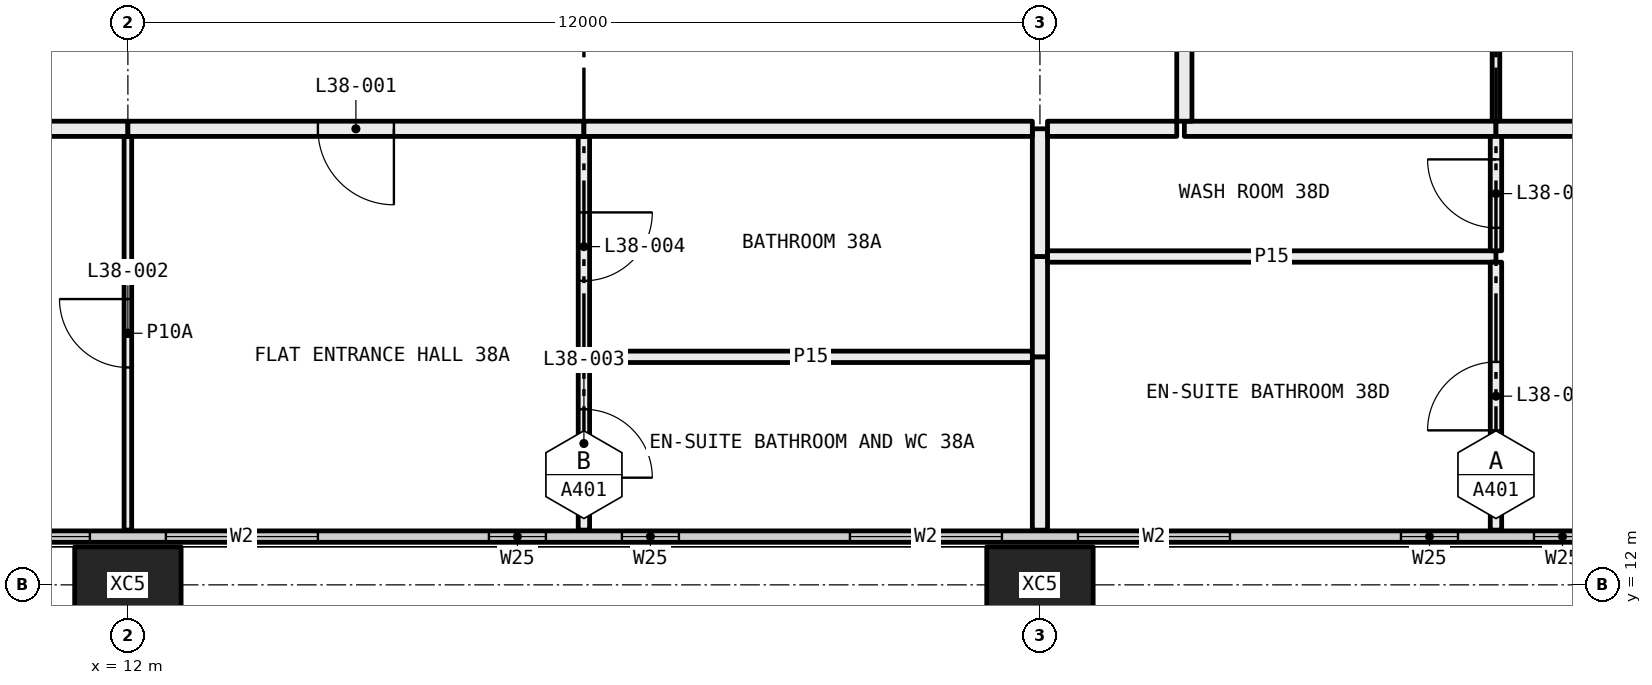
"""IFC4 building model, lengths in metres.
Left out: names, types, materials, properties, quantities, classifications, styles, units other than length and angle.
Written with IfcOpenShell. Run it as: python <this file> out.ifc"""

import sys

from ifc_helpers import new_model, si_unit, direction, frame, frame_2d, origin, origin_2d, place, context, subcontext, project, spatial, rectangle, hollow_rectangle, extrude, element, fill, save


model = new_model("IFC4")
c1 = context("Model", 3, precision=1e-05, world=origin(), true_north=direction((0.0, 1.0)))
c2 = subcontext(c1, "Body", "Model", "MODEL_VIEW")
j1 = project(units=[si_unit("LENGTHUNIT", "METRE"), si_unit("PLANEANGLEUNIT", "RADIAN")], contexts=[c1])
p1 = place(None, origin())
s1 = spatial("IfcSite", under=j1, at=p1, CompositionType="ELEMENT")
p2 = place(p1, origin())
s2 = spatial("IfcBuilding", under=s1, at=p2, CompositionType="ELEMENT")
p3 = place(p2, frame((0.0, 0.0, 144.9)))
s3 = spatial("IfcBuildingStorey", under=s2, at=p3, CompositionType="ELEMENT", Elevation=144.9)
for number, where, z_axis, x_axis in (
    (1, (12.0, 12.0, -0.4), (0.0, 0.0, 1.0), (1.0, 0.0, 0.0)),
    (2, (24.0, 12.0, -0.4), (0.0, 0.0, 1.0), (1.0, 0.0, 0.0)),
):
    element("IfcColumn", number, at=place(p3, frame(where, z_axis=z_axis, x_axis=x_axis)), inside=s3, PredefinedType="COLUMN", context=c2, shape_type="SweptSolid", body=[
        extrude(hollow_rectangle(XDim=1.4, YDim=1.0, WallThickness=0.055, at=origin_2d()), origin(), (0.0, 0.0, 1.0), 3.45),
    ])
p4 = place(p3, frame((6.56, 12.635, 0.0), z_axis=(0.0, 0.0, 1.0), x_axis=(1.0, 0.0, 0.0)))
e3 = element("IfcWall", 3, at=p4, inside=s3, PredefinedType="ELEMENTEDWALL", context=c2, shape_type="SweptSolid", body=[
    extrude(rectangle(XDim=58.88, YDim=0.15, at=frame_2d((29.44, 0.0))), origin(), (0.0, 0.0, 1.0), 3.05),
])
p5 = place(p4, frame((0.44, 0.0, 0.45)))
e4 = element("IfcOpeningElement", 4, at=p5, cuts=e3, PredefinedType="OPENING", context=c2, shape_type="SweptSolid", body=[
    extrude(rectangle(XDim=4.5, YDim=2.55, at=frame_2d((2.25, 1.275))), frame((0.0, 0.085, 0.0), z_axis=(0.0, -1.0, 0.0), x_axis=(1.0, 0.0, 0.0)), (0.0, 0.0, 1.0), 0.17),
])
p6 = place(p4, frame((5.94, 0.0, 0.45)))
e5 = element("IfcOpeningElement", 5, at=p6, cuts=e3, PredefinedType="OPENING", context=c2, shape_type="SweptSolid", body=[
    extrude(rectangle(XDim=2.0, YDim=2.55, at=frame_2d((1.0, 1.275))), frame((0.0, 0.085, 0.0), z_axis=(0.0, -1.0, 0.0), x_axis=(1.0, 0.0, 0.0)), (0.0, 0.0, 1.0), 0.17),
])
p7 = place(p4, frame((10.19, 0.0, 0.45)))
e6 = element("IfcOpeningElement", 6, at=p7, cuts=e3, PredefinedType="OPENING", context=c2, shape_type="SweptSolid", body=[
    extrude(rectangle(XDim=0.75, YDim=2.55, at=frame_2d((0.375, 1.275))), frame((0.0, 0.085, 0.0), z_axis=(0.0, -1.0, 0.0), x_axis=(1.0, 0.0, 0.0)), (0.0, 0.0, 1.0), 0.17),
])
p8 = place(p4, frame((11.94, 0.0, 0.45)))
e7 = element("IfcOpeningElement", 7, at=p8, cuts=e3, PredefinedType="OPENING", context=c2, shape_type="SweptSolid", body=[
    extrude(rectangle(XDim=0.75, YDim=2.55, at=frame_2d((0.375, 1.275))), frame((0.0, 0.085, 0.0), z_axis=(0.0, -1.0, 0.0), x_axis=(1.0, 0.0, 0.0)), (0.0, 0.0, 1.0), 0.17),
])
p9 = place(p4, frame((14.94, 0.0, 0.45)))
e8 = element("IfcOpeningElement", 8, at=p9, cuts=e3, PredefinedType="OPENING", context=c2, shape_type="SweptSolid", body=[
    extrude(rectangle(XDim=2.0, YDim=2.55, at=frame_2d((1.0, 1.275))), frame((0.0, 0.085, 0.0), z_axis=(0.0, -1.0, 0.0), x_axis=(1.0, 0.0, 0.0)), (0.0, 0.0, 1.0), 0.17),
])
p10 = place(p4, frame((17.94, 0.0, 0.45)))
e9 = element("IfcOpeningElement", 9, at=p10, cuts=e3, PredefinedType="OPENING", context=c2, shape_type="SweptSolid", body=[
    extrude(rectangle(XDim=2.0, YDim=2.55, at=frame_2d((1.0, 1.275))), frame((0.0, 0.085, 0.0), z_axis=(0.0, -1.0, 0.0), x_axis=(1.0, 0.0, 0.0)), (0.0, 0.0, 1.0), 0.17),
])
p11 = place(p4, frame((22.19, 0.0, 0.45)))
e10 = element("IfcOpeningElement", 10, at=p11, cuts=e3, PredefinedType="OPENING", context=c2, shape_type="SweptSolid", body=[
    extrude(rectangle(XDim=0.75, YDim=2.55, at=frame_2d((0.375, 1.275))), frame((0.0, 0.085, 0.0), z_axis=(0.0, -1.0, 0.0), x_axis=(1.0, 0.0, 0.0)), (0.0, 0.0, 1.0), 0.17),
])
p12 = place(p4, frame((23.94, 0.0, 0.45)))
e11 = element("IfcOpeningElement", 11, at=p12, cuts=e3, PredefinedType="OPENING", context=c2, shape_type="SweptSolid", body=[
    extrude(rectangle(XDim=0.75, YDim=2.55, at=frame_2d((0.375, 1.275))), frame((0.0, 0.085, 0.0), z_axis=(0.0, -1.0, 0.0), x_axis=(1.0, 0.0, 0.0)), (0.0, 0.0, 1.0), 0.17),
])
p13 = place(p4, frame((26.94, 0.0, 0.45)))
e12 = element("IfcOpeningElement", 12, at=p13, cuts=e3, PredefinedType="OPENING", context=c2, shape_type="SweptSolid", body=[
    extrude(rectangle(XDim=2.0, YDim=2.55, at=frame_2d((1.0, 1.275))), frame((0.0, 0.085, 0.0), z_axis=(0.0, -1.0, 0.0), x_axis=(1.0, 0.0, 0.0)), (0.0, 0.0, 1.0), 0.17),
])
p14 = place(p4, frame((29.94, 0.0, 0.45)))
e13 = element("IfcOpeningElement", 13, at=p14, cuts=e3, PredefinedType="OPENING", context=c2, shape_type="SweptSolid", body=[
    extrude(rectangle(XDim=2.0, YDim=2.55, at=frame_2d((1.0, 1.275))), frame((0.0, 0.085, 0.0), z_axis=(0.0, -1.0, 0.0), x_axis=(1.0, 0.0, 0.0)), (0.0, 0.0, 1.0), 0.17),
])
p15 = place(p4, frame((34.19, 0.0, 0.45)))
e14 = element("IfcOpeningElement", 14, at=p15, cuts=e3, PredefinedType="OPENING", context=c2, shape_type="SweptSolid", body=[
    extrude(rectangle(XDim=0.75, YDim=2.55, at=frame_2d((0.375, 1.275))), frame((0.0, 0.085, 0.0), z_axis=(0.0, -1.0, 0.0), x_axis=(1.0, 0.0, 0.0)), (0.0, 0.0, 1.0), 0.17),
])
p16 = place(p4, frame((35.94, 0.0, 0.45)))
e15 = element("IfcOpeningElement", 15, at=p16, cuts=e3, PredefinedType="OPENING", context=c2, shape_type="SweptSolid", body=[
    extrude(rectangle(XDim=0.75, YDim=2.55, at=frame_2d((0.375, 1.275))), frame((0.0, 0.085, 0.0), z_axis=(0.0, -1.0, 0.0), x_axis=(1.0, 0.0, 0.0)), (0.0, 0.0, 1.0), 0.17),
])
p17 = place(p4, frame((38.94, 0.0, 0.45)))
e16 = element("IfcOpeningElement", 16, at=p17, cuts=e3, PredefinedType="OPENING", context=c2, shape_type="SweptSolid", body=[
    extrude(rectangle(XDim=2.0, YDim=2.55, at=frame_2d((1.0, 1.275))), frame((0.0, 0.085, 0.0), z_axis=(0.0, -1.0, 0.0), x_axis=(1.0, 0.0, 0.0)), (0.0, 0.0, 1.0), 0.17),
])
p18 = place(p4, frame((41.94, 0.0, 0.45)))
e17 = element("IfcOpeningElement", 17, at=p18, cuts=e3, PredefinedType="OPENING", context=c2, shape_type="SweptSolid", body=[
    extrude(rectangle(XDim=2.0, YDim=2.55, at=frame_2d((1.0, 1.275))), frame((0.0, 0.085, 0.0), z_axis=(0.0, -1.0, 0.0), x_axis=(1.0, 0.0, 0.0)), (0.0, 0.0, 1.0), 0.17),
])
p19 = place(p4, frame((46.19, 0.0, 0.45)))
e18 = element("IfcOpeningElement", 18, at=p19, cuts=e3, PredefinedType="OPENING", context=c2, shape_type="SweptSolid", body=[
    extrude(rectangle(XDim=0.75, YDim=2.55, at=frame_2d((0.375, 1.275))), frame((0.0, 0.085, 0.0), z_axis=(0.0, -1.0, 0.0), x_axis=(1.0, 0.0, 0.0)), (0.0, 0.0, 1.0), 0.17),
])
p20 = place(p4, frame((47.94, 0.0, 0.45)))
e19 = element("IfcOpeningElement", 19, at=p20, cuts=e3, PredefinedType="OPENING", context=c2, shape_type="SweptSolid", body=[
    extrude(rectangle(XDim=0.75, YDim=2.55, at=frame_2d((0.375, 1.275))), frame((0.0, 0.085, 0.0), z_axis=(0.0, -1.0, 0.0), x_axis=(1.0, 0.0, 0.0)), (0.0, 0.0, 1.0), 0.17),
])
p21 = place(p4, frame((50.94, 0.0, 0.45)))
e20 = element("IfcOpeningElement", 20, at=p21, cuts=e3, PredefinedType="OPENING", context=c2, shape_type="SweptSolid", body=[
    extrude(rectangle(XDim=2.0, YDim=2.55, at=frame_2d((1.0, 1.275))), frame((0.0, 0.085, 0.0), z_axis=(0.0, -1.0, 0.0), x_axis=(1.0, 0.0, 0.0)), (0.0, 0.0, 1.0), 0.17),
])
p22 = place(p4, frame((53.94, 0.0, 0.45)))
e21 = element("IfcOpeningElement", 21, at=p22, cuts=e3, PredefinedType="OPENING", context=c2, shape_type="SweptSolid", body=[
    extrude(rectangle(XDim=4.5, YDim=2.55, at=frame_2d((2.25, 1.275))), frame((0.0, 0.085, 0.0), z_axis=(0.0, -1.0, 0.0), x_axis=(1.0, 0.0, 0.0)), (0.0, 0.0, 1.0), 0.17),
])
p23 = place(p3, frame((12.0, 12.72, 0.0), z_axis=(0.0, 0.0, 1.0), x_axis=(0.0, 1.0, 0.0)))
e22 = element("IfcWall", 22, at=p23, inside=s3, PredefinedType="PARTITIONING", context=c2, shape_type="SweptSolid", body=[
    extrude(rectangle(XDim=5.18, YDim=0.1, at=frame_2d((2.59, 0.0))), origin(), (0.0, 0.0, 1.0), 3.05),
])
p24 = place(p23, frame((2.14, 0.0, 0.0)))
e23 = element("IfcOpeningElement", 23, at=p24, cuts=e22, PredefinedType="OPENING", context=c2, shape_type="SweptSolid", body=[
    extrude(rectangle(XDim=0.9, YDim=2.1, at=frame_2d((0.45, 1.05))), frame((0.0, 0.06, 0.0), z_axis=(0.0, -1.0, 0.0), x_axis=(1.0, 0.0, 0.0)), (0.0, 0.0, 1.0), 0.12),
])
p25 = place(p3, frame((12.0, 18.0, 0.0), z_axis=(0.0, 0.0, 1.0), x_axis=(-1.0, 0.0, 0.0)))
e24 = element("IfcWall", 24, at=p25, inside=s3, PredefinedType="PARTITIONING", context=c2, shape_type="SweptSolid", body=[
    extrude(rectangle(XDim=1.9, YDim=0.2, at=frame_2d((0.95, 0.0))), origin(), (0.0, 0.0, 1.0), 3.05),
])
p26 = place(p3, frame((18.0, 12.72, 0.0), z_axis=(0.0, 0.0, 1.0), x_axis=(0.0, 1.0, 0.0)))
e25 = element("IfcWall", 25, at=p26, inside=s3, PredefinedType="PARTITIONING", context=c2, shape_type="SweptSolid", body=[
    extrude(rectangle(XDim=2.28, YDim=0.15, at=frame_2d((1.14, 0.0))), origin(), (0.0, 0.0, 1.0), 3.05),
])
p27 = place(p26, frame((0.69, 0.0, 0.0)))
e26 = element("IfcOpeningElement", 26, at=p27, cuts=e25, PredefinedType="OPENING", context=c2, shape_type="SweptSolid", body=[
    extrude(rectangle(XDim=0.9, YDim=2.1, at=frame_2d((0.45, 1.05))), frame((0.0, 0.085, 0.0), z_axis=(0.0, -1.0, 0.0), x_axis=(1.0, 0.0, 0.0)), (0.0, 0.0, 1.0), 0.17),
])
p28 = place(p3, frame((18.0, 15.0, 0.0), z_axis=(0.0, 0.0, 1.0), x_axis=(0.0, 1.0, 0.0)))
e27 = element("IfcWall", 27, at=p28, inside=s3, PredefinedType="PARTITIONING", context=c2, shape_type="SweptSolid", body=[
    extrude(rectangle(XDim=2.9, YDim=0.15, at=frame_2d((1.45, 0.0))), origin(), (0.0, 0.0, 1.0), 3.05),
])
p29 = place(p28, frame((1.0, 0.0, 0.0)))
e28 = element("IfcOpeningElement", 28, at=p29, cuts=e27, PredefinedType="OPENING", context=c2, shape_type="SweptSolid", body=[
    extrude(rectangle(XDim=0.9, YDim=2.1, at=frame_2d((0.45, 1.05))), frame((0.0, 0.085, 0.0), z_axis=(0.0, -1.0, 0.0), x_axis=(1.0, 0.0, 0.0)), (0.0, 0.0, 1.0), 0.17),
])
p30 = place(p3, frame((18.0, 18.0, 0.0), z_axis=(0.0, 0.0, 1.0), x_axis=(-1.0, 0.0, 0.0)))
e29 = element("IfcWall", 29, at=p30, inside=s3, PredefinedType="PARTITIONING", context=c2, shape_type="SweptSolid", body=[
    extrude(rectangle(XDim=6.0, YDim=0.2, at=frame_2d((3.0, 0.0))), origin(), (0.0, 0.0, 1.0), 3.05),
])
p31 = place(p30, frame((2.5, 0.0, 0.0)))
e30 = element("IfcOpeningElement", 30, at=p31, cuts=e29, PredefinedType="OPENING", context=c2, shape_type="SweptSolid", body=[
    extrude(rectangle(XDim=1.0, YDim=2.1, at=frame_2d((0.5, 1.05))), frame((0.0, 0.11, 0.0), z_axis=(0.0, -1.0, 0.0), x_axis=(1.0, 0.0, 0.0)), (0.0, 0.0, 1.0), 0.22),
])
p32 = place(p3, frame((23.9, 15.0, 0.0), z_axis=(0.0, 0.0, 1.0), x_axis=(-1.0, 0.0, 0.0)))
e31 = element("IfcWall", 31, at=p32, inside=s3, PredefinedType="PARTITIONING", context=c2, shape_type="SweptSolid", body=[
    extrude(rectangle(XDim=5.825, YDim=0.15, at=frame_2d((2.913, 0.0))), origin(), (0.0, 0.0, 1.0), 3.05),
])
p33 = place(p3, frame((24.0, 12.72, 0.0), z_axis=(0.0, 0.0, 1.0), x_axis=(0.0, 1.0, 0.0)))
e32 = element("IfcWall", 32, at=p33, inside=s3, PredefinedType="PARTITIONING", context=c2, shape_type="SweptSolid", body=[
    extrude(rectangle(XDim=2.28, YDim=0.2, at=frame_2d((1.14, 0.0))), origin(), (0.0, 0.0, 1.0), 3.05),
])
p34 = place(p3, frame((24.0, 15.0, 0.0), z_axis=(0.0, 0.0, 1.0), x_axis=(0.0, 1.0, 0.0)))
e33 = element("IfcWall", 33, at=p34, inside=s3, PredefinedType="PARTITIONING", context=c2, shape_type="SweptSolid", body=[
    extrude(rectangle(XDim=1.32, YDim=0.2, at=frame_2d((0.66, 0.0))), origin(), (0.0, 0.0, 1.0), 3.05),
])
p35 = place(p3, frame((24.0, 16.32, 0.0), z_axis=(0.0, 0.0, 1.0), x_axis=(0.0, 1.0, 0.0)))
e34 = element("IfcWall", 34, at=p35, inside=s3, PredefinedType="PARTITIONING", context=c2, shape_type="SweptSolid", body=[
    extrude(rectangle(XDim=1.68, YDim=0.2, at=frame_2d((0.84, 0.0))), origin(), (0.0, 0.0, 1.0), 3.05),
])
p36 = place(p3, frame((23.9, 18.0, 0.0), z_axis=(0.0, 0.0, 1.0), x_axis=(-1.0, 0.0, 0.0)))
e35 = element("IfcWall", 35, at=p36, inside=s3, PredefinedType="PARTITIONING", context=c2, shape_type="SweptSolid", body=[
    extrude(rectangle(XDim=5.9, YDim=0.2, at=frame_2d((2.95, 0.0))), origin(), (0.0, 0.0, 1.0), 3.05),
])
p37 = place(p3, frame((30.0, 18.1, 0.0), z_axis=(0.0, 0.0, 1.0), x_axis=(0.0, 1.0, 0.0)))
e36 = element("IfcWall", 36, at=p37, inside=s3, PredefinedType="PARTITIONING", context=c2, shape_type="SweptSolid", body=[
    extrude(rectangle(XDim=6.2, YDim=0.1, at=frame_2d((3.1, 0.0))), origin(), (0.0, 0.0, 1.0), 2.45),
])
p38 = place(p3, frame((25.9, 18.0, 0.0), z_axis=(0.0, 0.0, 1.0), x_axis=(1.0, 0.0, 0.0)))
e37 = element("IfcWall", 37, at=p38, inside=s3, PredefinedType="PARTITIONING", context=c2, shape_type="SweptSolid", body=[
    extrude(rectangle(XDim=4.1, YDim=0.2, at=frame_2d((2.05, 0.0))), origin(), (0.0, 0.0, 1.0), 3.05),
])
p39 = place(p3, frame((25.9, 23.9, 0.0), z_axis=(0.0, 0.0, 1.0), x_axis=(0.0, -1.0, 0.0)))
e38 = element("IfcWall", 38, at=p39, inside=s3, PredefinedType="PARTITIONING", context=c2, shape_type="SweptSolid", body=[
    extrude(rectangle(XDim=5.8, YDim=0.2, at=frame_2d((2.9, 0.0))), origin(), (0.0, 0.0, 1.0), 3.05),
])
p40 = place(p3, frame((30.0, 18.0, 0.0), z_axis=(0.0, 0.0, 1.0), x_axis=(1.0, 0.0, 0.0)))
e39 = element("IfcWall", 39, at=p40, inside=s3, PredefinedType="PARTITIONING", context=c2, shape_type="SweptSolid", body=[
    extrude(rectangle(XDim=6.0, YDim=0.2, at=frame_2d((3.0, 0.0))), origin(), (0.0, 0.0, 1.0), 2.45),
])
p41 = place(p3, frame((30.0, 16.32, 0.0), z_axis=(0.0, 0.0, 1.0), x_axis=(-1.0, 0.0, 0.0)))
e40 = element("IfcWall", 40, at=p41, inside=s3, PredefinedType="PARTITIONING", context=c2, shape_type="SweptSolid", body=[
    extrude(rectangle(XDim=5.9, YDim=0.15, at=frame_2d((2.95, 0.0))), origin(), (0.0, 0.0, 1.0), 3.05),
])
p42 = place(p3, frame((30.0, 12.72, 0.0), z_axis=(0.0, 0.0, 1.0), x_axis=(0.0, 1.0, 0.0)))
e41 = element("IfcWall", 41, at=p42, inside=s3, PredefinedType="PARTITIONING", context=c2, shape_type="SweptSolid", body=[
    extrude(rectangle(XDim=3.525, YDim=0.15, at=frame_2d((1.763, 0.0))), origin(), (0.0, 0.0, 1.0), 3.05),
])
p43 = place(p42, frame((1.312, 0.0, 0.0)))
e42 = element("IfcOpeningElement", 42, at=p43, cuts=e41, PredefinedType="OPENING", context=c2, shape_type="SweptSolid", body=[
    extrude(rectangle(XDim=0.9, YDim=2.1, at=frame_2d((0.45, 1.05))), frame((0.0, 0.085, 0.0), z_axis=(0.0, -1.0, 0.0), x_axis=(1.0, 0.0, 0.0)), (0.0, 0.0, 1.0), 0.17),
])
p44 = place(p3, frame((30.0, 16.395, 0.0), z_axis=(0.0, 0.0, 1.0), x_axis=(0.0, 1.0, 0.0)))
e43 = element("IfcWall", 43, at=p44, inside=s3, PredefinedType="PARTITIONING", context=c2, shape_type="SweptSolid", body=[
    extrude(rectangle(XDim=1.505, YDim=0.15, at=frame_2d((0.752, 0.0))), origin(), (0.0, 0.0, 1.0), 3.05),
])
p45 = place(p44, frame((0.302, 0.0, 0.0)))
e44 = element("IfcOpeningElement", 44, at=p45, cuts=e43, PredefinedType="OPENING", context=c2, shape_type="SweptSolid", body=[
    extrude(rectangle(XDim=0.9, YDim=2.1, at=frame_2d((0.45, 1.05))), frame((0.0, 0.085, 0.0), z_axis=(0.0, -1.0, 0.0), x_axis=(1.0, 0.0, 0.0)), (0.0, 0.0, 1.0), 0.17),
])
p46 = place(p3, frame((25.8, 18.0, 0.0), z_axis=(0.0, 0.0, 1.0), x_axis=(-1.0, 0.0, 0.0)))
e45 = element("IfcWall", 45, at=p46, inside=s3, PredefinedType="PARTITIONING", context=c2, shape_type="SweptSolid", body=[
    extrude(rectangle(XDim=1.7, YDim=0.2, at=frame_2d((0.85, 0.0))), origin(), (0.0, 0.0, 1.0), 3.05),
])
p47 = place(p5, origin())
e46 = element("IfcWindow", 46, at=p47, inside=s3, PartitioningType="SINGLE_PANEL", PredefinedType="WINDOW", context=c2, shape_type="SweptSolid", body=[
    extrude(rectangle(XDim=4.5, YDim=2.55, at=frame_2d((2.25, 1.275))), frame((0.0, 0.03, 0.0), z_axis=(0.0, -1.0, 0.0), x_axis=(1.0, 0.0, 0.0)), (0.0, 0.0, 1.0), 0.06),
])
fill(e4, e46)
p48 = place(p6, origin())
e47 = element("IfcWindow", 47, at=p48, inside=s3, PartitioningType="SINGLE_PANEL", PredefinedType="WINDOW", context=c2, shape_type="SweptSolid", body=[
    extrude(rectangle(XDim=2.0, YDim=2.55, at=frame_2d((1.0, 1.275))), frame((0.0, 0.03, 0.0), z_axis=(0.0, -1.0, 0.0), x_axis=(1.0, 0.0, 0.0)), (0.0, 0.0, 1.0), 0.06),
])
fill(e5, e47)
p49 = place(p7, origin())
e48 = element("IfcWindow", 48, at=p49, inside=s3, PartitioningType="SINGLE_PANEL", PredefinedType="WINDOW", context=c2, shape_type="SweptSolid", body=[
    extrude(rectangle(XDim=0.75, YDim=2.55, at=frame_2d((0.375, 1.275))), frame((0.0, 0.03, 0.0), z_axis=(0.0, -1.0, 0.0), x_axis=(1.0, 0.0, 0.0)), (0.0, 0.0, 1.0), 0.06),
])
fill(e6, e48)
p50 = place(p8, origin())
e49 = element("IfcWindow", 49, at=p50, inside=s3, PartitioningType="SINGLE_PANEL", PredefinedType="WINDOW", context=c2, shape_type="SweptSolid", body=[
    extrude(rectangle(XDim=0.75, YDim=2.55, at=frame_2d((0.375, 1.275))), frame((0.0, 0.03, 0.0), z_axis=(0.0, -1.0, 0.0), x_axis=(1.0, 0.0, 0.0)), (0.0, 0.0, 1.0), 0.06),
])
fill(e7, e49)
p51 = place(p9, origin())
e50 = element("IfcWindow", 50, at=p51, inside=s3, PartitioningType="SINGLE_PANEL", PredefinedType="WINDOW", context=c2, shape_type="SweptSolid", body=[
    extrude(rectangle(XDim=2.0, YDim=2.55, at=frame_2d((1.0, 1.275))), frame((0.0, 0.03, 0.0), z_axis=(0.0, -1.0, 0.0), x_axis=(1.0, 0.0, 0.0)), (0.0, 0.0, 1.0), 0.06),
])
fill(e8, e50)
p52 = place(p10, origin())
e51 = element("IfcWindow", 51, at=p52, inside=s3, PartitioningType="SINGLE_PANEL", PredefinedType="WINDOW", context=c2, shape_type="SweptSolid", body=[
    extrude(rectangle(XDim=2.0, YDim=2.55, at=frame_2d((1.0, 1.275))), frame((0.0, 0.03, 0.0), z_axis=(0.0, -1.0, 0.0), x_axis=(1.0, 0.0, 0.0)), (0.0, 0.0, 1.0), 0.06),
])
fill(e9, e51)
p53 = place(p11, origin())
e52 = element("IfcWindow", 52, at=p53, inside=s3, PartitioningType="SINGLE_PANEL", PredefinedType="WINDOW", context=c2, shape_type="SweptSolid", body=[
    extrude(rectangle(XDim=0.75, YDim=2.55, at=frame_2d((0.375, 1.275))), frame((0.0, 0.03, 0.0), z_axis=(0.0, -1.0, 0.0), x_axis=(1.0, 0.0, 0.0)), (0.0, 0.0, 1.0), 0.06),
])
fill(e10, e52)
p54 = place(p12, origin())
e53 = element("IfcWindow", 53, at=p54, inside=s3, PartitioningType="SINGLE_PANEL", PredefinedType="WINDOW", context=c2, shape_type="SweptSolid", body=[
    extrude(rectangle(XDim=0.75, YDim=2.55, at=frame_2d((0.375, 1.275))), frame((0.0, 0.03, 0.0), z_axis=(0.0, -1.0, 0.0), x_axis=(1.0, 0.0, 0.0)), (0.0, 0.0, 1.0), 0.06),
])
fill(e11, e53)
p55 = place(p31, origin())
e54 = element("IfcDoor", 54, at=p55, inside=s3, OperationType="SINGLE_SWING_RIGHT", PredefinedType="DOOR", context=c2, shape_type="SweptSolid", body=[
    extrude(rectangle(XDim=1.0, YDim=2.1, at=frame_2d((0.5, 1.05))), frame((0.0, 0.025, 0.0), z_axis=(0.0, -1.0, 0.0), x_axis=(1.0, 0.0, 0.0)), (0.0, 0.0, 1.0), 0.05),
])
fill(e30, e54)
p56 = place(p24, origin())
e55 = element("IfcDoor", 55, at=p56, inside=s3, OperationType="SINGLE_SWING_LEFT", PredefinedType="DOOR", context=c2, shape_type="SweptSolid", body=[
    extrude(rectangle(XDim=0.9, YDim=2.1, at=frame_2d((0.45, 1.05))), frame((0.0, 0.025, 0.0), z_axis=(0.0, -1.0, 0.0), x_axis=(1.0, 0.0, 0.0)), (0.0, 0.0, 1.0), 0.05),
])
fill(e23, e55)
p57 = place(p27, frame((0.9, 0.0, 0.0), x_axis=(-1.0, 0.0, 0.0)))
e56 = element("IfcDoor", 56, at=p57, inside=s3, OperationType="SINGLE_SWING_LEFT", PredefinedType="DOOR", context=c2, shape_type="SweptSolid", body=[
    extrude(rectangle(XDim=0.9, YDim=2.1, at=frame_2d((0.45, 1.05))), frame((0.0, 0.025, 0.0), z_axis=(0.0, -1.0, 0.0), x_axis=(1.0, 0.0, 0.0)), (0.0, 0.0, 1.0), 0.05),
])
fill(e26, e56)
p58 = place(p29, frame((0.9, 0.0, 0.0), x_axis=(-1.0, 0.0, 0.0)))
e57 = element("IfcDoor", 57, at=p58, inside=s3, OperationType="SINGLE_SWING_RIGHT", PredefinedType="DOOR", context=c2, shape_type="SweptSolid", body=[
    extrude(rectangle(XDim=0.9, YDim=2.1, at=frame_2d((0.45, 1.05))), frame((0.0, 0.025, 0.0), z_axis=(0.0, -1.0, 0.0), x_axis=(1.0, 0.0, 0.0)), (0.0, 0.0, 1.0), 0.05),
])
fill(e28, e57)
p59 = place(p43, origin())
e58 = element("IfcDoor", 58, at=p59, inside=s3, OperationType="SINGLE_SWING_RIGHT", PredefinedType="DOOR", context=c2, shape_type="SweptSolid", body=[
    extrude(rectangle(XDim=0.9, YDim=2.1, at=frame_2d((0.45, 1.05))), frame((0.0, 0.025, 0.0), z_axis=(0.0, -1.0, 0.0), x_axis=(1.0, 0.0, 0.0)), (0.0, 0.0, 1.0), 0.05),
])
fill(e42, e58)
p60 = place(p45, origin())
e59 = element("IfcDoor", 59, at=p60, inside=s3, OperationType="SINGLE_SWING_LEFT", PredefinedType="DOOR", context=c2, shape_type="SweptSolid", body=[
    extrude(rectangle(XDim=0.9, YDim=2.1, at=frame_2d((0.45, 1.05))), frame((0.0, 0.025, 0.0), z_axis=(0.0, -1.0, 0.0), x_axis=(1.0, 0.0, 0.0)), (0.0, 0.0, 1.0), 0.05),
])
fill(e44, e59)
save(model, sys.argv[1])
